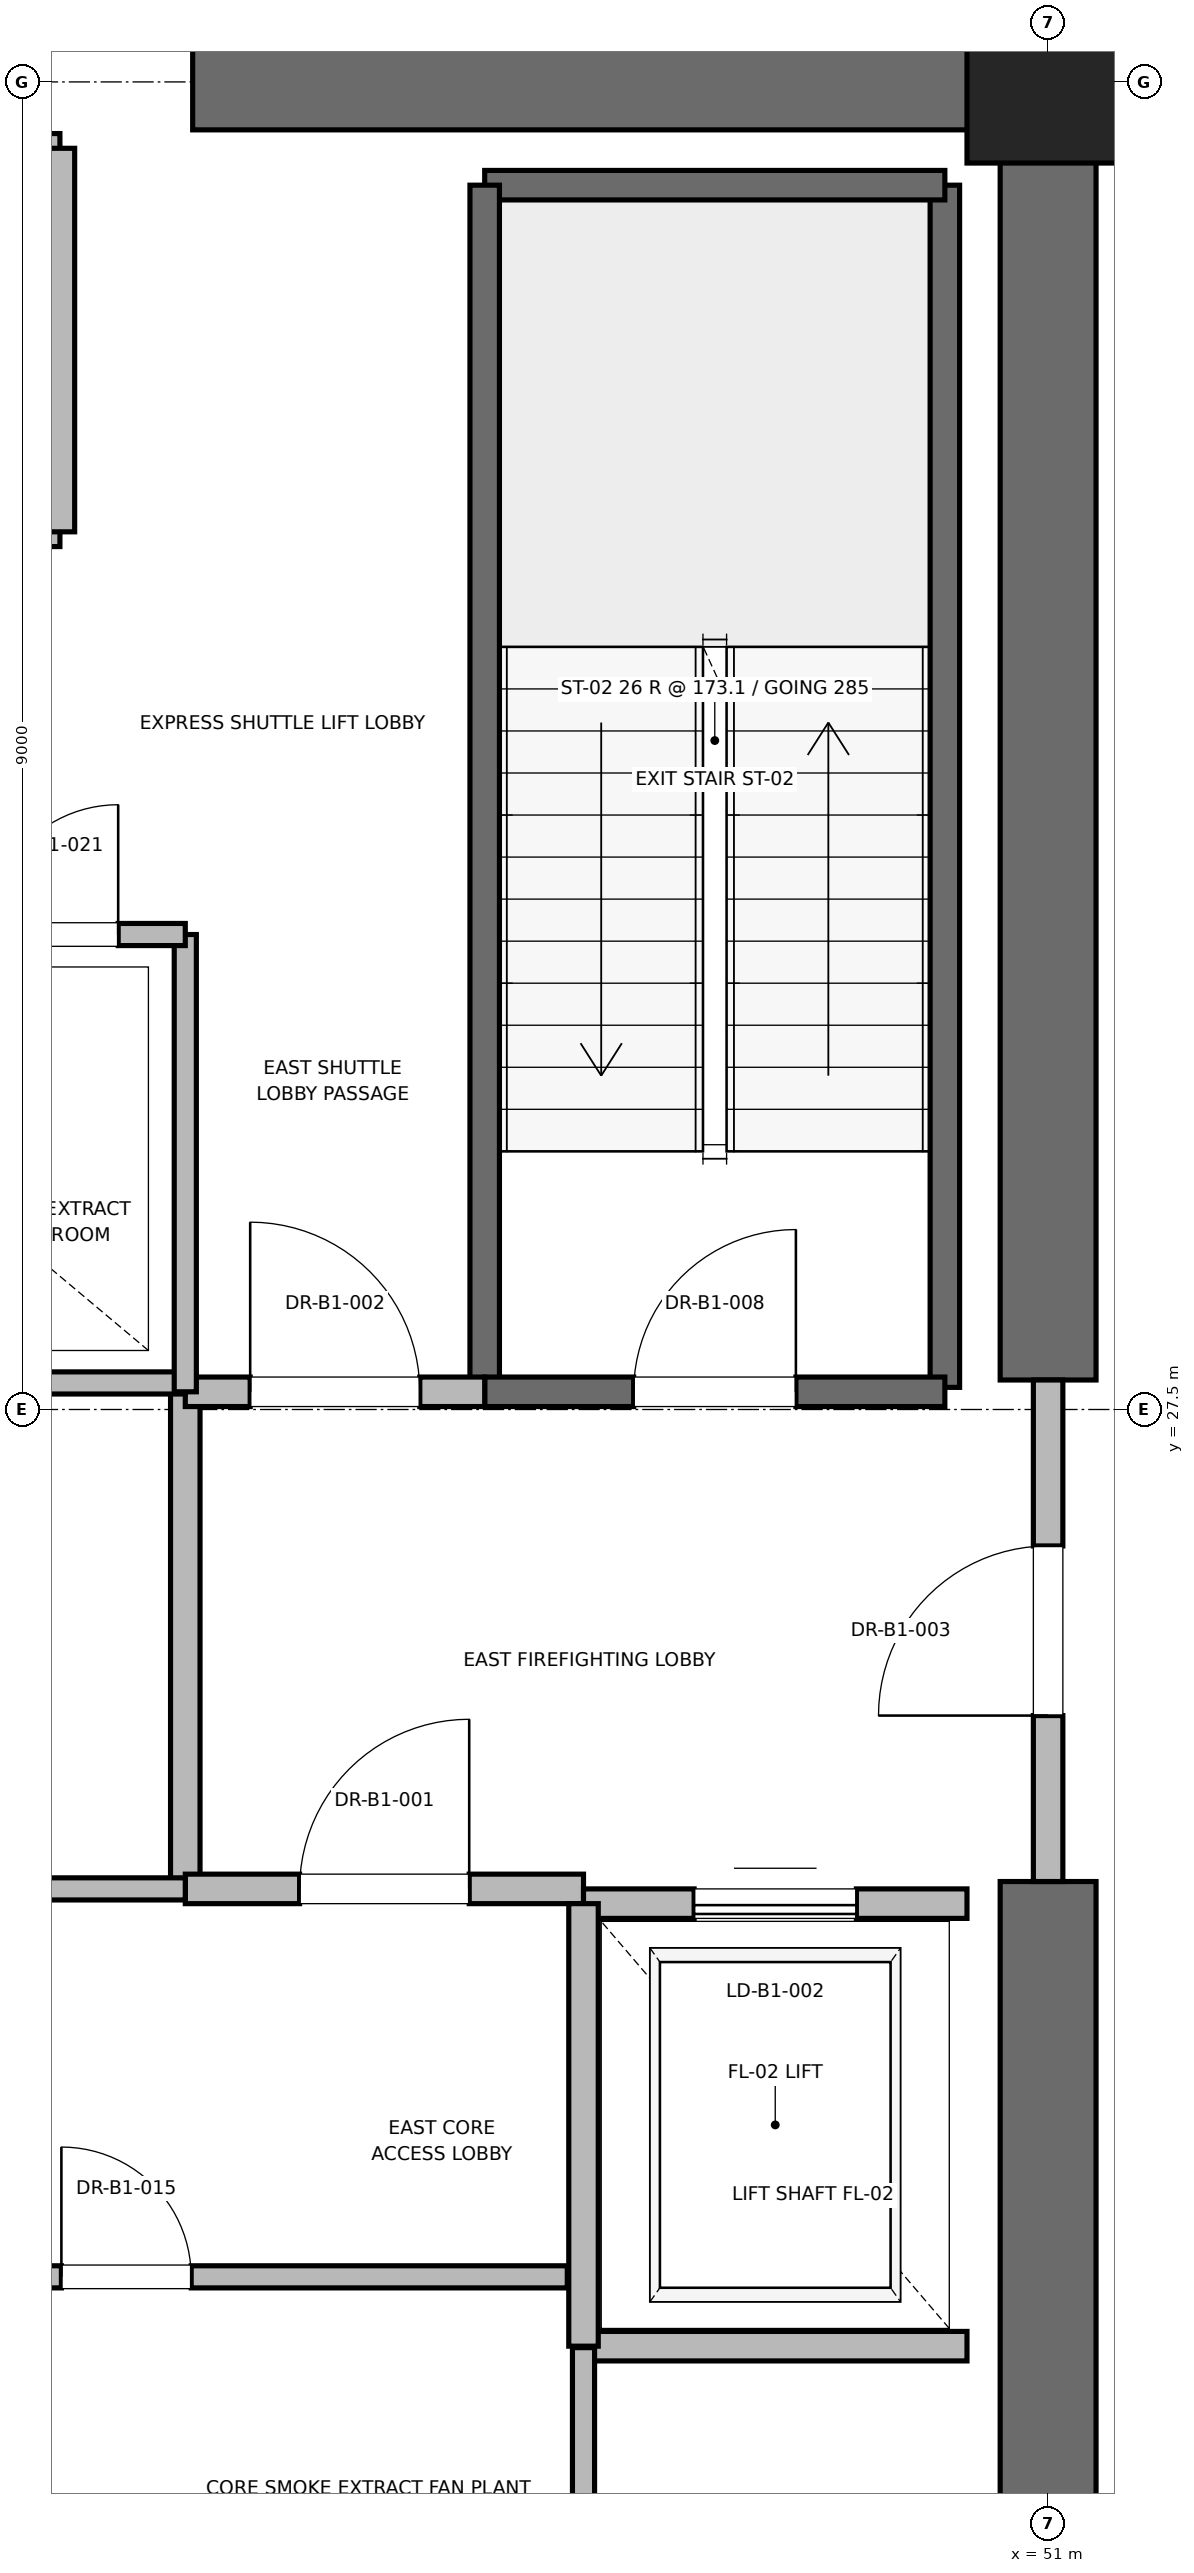
"""IFC4 building model, lengths in metres.
Left out: names, types, materials, properties, quantities, classifications, styles, units other than length and angle.
Written with IfcOpenShell. Run it as: python <this file> out.ifc"""

import sys

from ifc_helpers import new_model, si_unit, direction, frame, frame_2d, origin, origin_2d, place, context, subcontext, project, spatial, rectangle, extrude, element, fill, save


model = new_model("IFC4")
c1 = context("Model", 3, precision=1e-05, world=origin(), true_north=direction((0.0, 1.0)))
c2 = subcontext(c1, "Body", "Model", "MODEL_VIEW")
j1 = project(units=[si_unit("LENGTHUNIT", "METRE"), si_unit("PLANEANGLEUNIT", "RADIAN")], contexts=[c1])
p1 = place(None, origin())
s1 = spatial("IfcSite", under=j1, at=p1, CompositionType="ELEMENT")
p2 = place(p1, origin())
s2 = spatial("IfcBuilding", under=s1, at=p2, CompositionType="ELEMENT")
p3 = place(p2, frame((0.0, 0.0, -4.5)))
s3 = spatial("IfcBuildingStorey", under=s2, at=p3, CompositionType="ELEMENT", Elevation=-4.5)
p4 = place(p3, frame((51.0, 36.5, 0.0), z_axis=(0.0, 0.0, 1.0), x_axis=(1.0, 0.0, 0.0)))
e1 = element("IfcColumn", 1, at=p4, inside=s3, PredefinedType="PILASTER", context=c2, shape_type="SweptSolid", body=[
    extrude(rectangle(XDim=1.1, YDim=1.1, at=origin_2d()), origin(), (0.0, 0.0, 1.0), 4.5),
])
for number, where, z_axis, x_axis in (
    (2, (45.2, 36.5, 0.0), (0.0, 0.0, 1.0), (1.0, 0.0, 0.0)),
    (3, (51.0, 18.5, 0.0), (0.0, 0.0, 1.0), (0.0, 1.0, 0.0)),
):
    element("IfcWall", number, at=place(p3, frame(where, z_axis=z_axis, x_axis=x_axis)), inside=s3, PredefinedType="SHEAR", context=c2, shape_type="SweptSolid", body=[
        extrude(rectangle(XDim=5.8, YDim=0.65, at=frame_2d((2.9, 0.0))), origin(), (0.0, 0.0, 1.0), 4.22),
    ])
p5 = place(p3, frame((51.0, 27.7, 0.0), z_axis=(0.0, 0.0, 1.0), x_axis=(0.0, 1.0, 0.0)))
e4 = element("IfcWall", 4, at=p5, inside=s3, PredefinedType="SHEAR", context=c2, shape_type="SweptSolid", body=[
    extrude(rectangle(XDim=8.8, YDim=0.65, at=frame_2d((4.4, 0.0))), origin(), (0.0, 0.0, 1.0), 4.22),
])
p6 = place(p3, frame((50.3, 27.65, 0.0), z_axis=(0.0, 0.0, 1.0), x_axis=(0.0, 1.0, 0.0)))
e5 = element("IfcWall", 5, at=p6, inside=s3, PredefinedType="SOLIDWALL", context=c2, shape_type="SweptSolid", body=[
    extrude(rectangle(XDim=8.15, YDim=0.2, at=frame_2d((4.075, 0.0))), origin(), (0.0, 0.0, 1.0), 4.22),
])
p7 = place(p3, frame((47.18, 35.8, 0.0), z_axis=(0.0, 0.0, 1.0), x_axis=(1.0, 0.0, 0.0)))
e6 = element("IfcWall", 6, at=p7, inside=s3, PredefinedType="SOLIDWALL", context=c2, shape_type="SweptSolid", body=[
    extrude(rectangle(XDim=3.12, YDim=0.2, at=frame_2d((1.56, 0.0))), origin(), (0.0, 0.0, 1.0), 4.22),
])
p8 = place(p3, frame((47.18, 27.62, 0.0), z_axis=(0.0, 0.0, 1.0), x_axis=(0.0, 1.0, 0.0)))
e7 = element("IfcWall", 7, at=p8, inside=s3, PredefinedType="SOLIDWALL", context=c2, shape_type="SweptSolid", body=[
    extrude(rectangle(XDim=8.18, YDim=0.2, at=frame_2d((4.09, 0.0))), origin(), (0.0, 0.0, 1.0), 4.22),
])
p9 = place(p3, frame((47.18, 27.62, 0.0), z_axis=(0.0, 0.0, 1.0), x_axis=(1.0, 0.0, 0.0)))
e8 = element("IfcWall", 8, at=p9, inside=s3, PredefinedType="SOLIDWALL", context=c2, shape_type="SweptSolid", body=[
    extrude(rectangle(XDim=3.12, YDim=0.2, at=frame_2d((1.56, 0.0))), origin(), (0.0, 0.0, 1.0), 4.22),
])
p10 = place(p9, frame((1.01, 0.0, 0.0)))
e9 = element("IfcOpeningElement", 9, at=p10, cuts=e8, PredefinedType="OPENING", context=c2, shape_type="SweptSolid", body=[
    extrude(rectangle(XDim=1.1, YDim=2.15, at=frame_2d((0.55, 1.075))), frame((0.0, 0.1, 0.0), z_axis=(0.0, -1.0, 0.0), x_axis=(1.0, 0.0, 0.0)), (0.0, 0.0, 1.0), 0.2),
])
p11 = place(p3, frame((45.15, 24.25, 0.0), z_axis=(0.0, 0.0, 1.0), x_axis=(0.0, 1.0, 0.0)))
e10 = element("IfcWall", 10, at=p11, inside=s3, PredefinedType="PARTITIONING", context=c2, shape_type="SweptSolid", body=[
    extrude(rectangle(XDim=3.37, YDim=0.2, at=frame_2d((1.685, 0.0))), origin(), (0.0, 0.0, 1.0), 4.22),
])
p12 = place(p3, frame((45.15, 24.25, 0.0), z_axis=(0.0, 0.0, 1.0), x_axis=(1.0, 0.0, 0.0)))
e11 = element("IfcWall", 11, at=p12, inside=s3, PredefinedType="PARTITIONING", context=c2, shape_type="SweptSolid", body=[
    extrude(rectangle(XDim=2.7, YDim=0.2, at=frame_2d((1.35, 0.0))), origin(), (0.0, 0.0, 1.0), 4.22),
])
p13 = place(p12, frame((0.775, 0.0, 0.0)))
e12 = element("IfcOpeningElement", 12, at=p13, cuts=e11, PredefinedType="OPENING", context=c2, shape_type="SweptSolid", body=[
    extrude(rectangle(XDim=1.15, YDim=2.2, at=frame_2d((0.575, 1.1))), frame((0.0, 0.1, 0.0), z_axis=(0.0, -1.0, 0.0), x_axis=(1.0, 0.0, 0.0)), (0.0, 0.0, 1.0), 0.2),
])
p14 = place(p3, frame((45.15, 27.62, 0.0), z_axis=(0.0, 0.0, 1.0), x_axis=(1.0, 0.0, 0.0)))
e13 = element("IfcWall", 13, at=p14, inside=s3, PredefinedType="PARTITIONING", context=c2, shape_type="SweptSolid", body=[
    extrude(rectangle(XDim=2.03, YDim=0.2, at=frame_2d((1.015, 0.0))), origin(), (0.0, 0.0, 1.0), 4.22),
])
p15 = place(p14, frame((0.44, 0.0, 0.0)))
e14 = element("IfcOpeningElement", 14, at=p15, cuts=e13, PredefinedType="OPENING", context=c2, shape_type="SweptSolid", body=[
    extrude(rectangle(XDim=1.15, YDim=2.2, at=frame_2d((0.575, 1.1))), frame((0.0, 0.1, 0.0), z_axis=(0.0, -1.0, 0.0), x_axis=(1.0, 0.0, 0.0)), (0.0, 0.0, 1.0), 0.2),
])
p16 = place(p3, frame((51.0, 24.3, 0.0), z_axis=(0.0, 0.0, 1.0), x_axis=(0.0, 1.0, 0.0)))
e15 = element("IfcWall", 15, at=p16, inside=s3, PredefinedType="PARTITIONING", context=c2, shape_type="SweptSolid", body=[
    extrude(rectangle(XDim=3.4, YDim=0.2, at=frame_2d((1.7, 0.0))), origin(), (0.0, 0.0, 1.0), 3.0),
])
p17 = place(p16, frame((1.125, 0.0, 0.0)))
e16 = element("IfcOpeningElement", 16, at=p17, cuts=e15, PredefinedType="OPENING", context=c2, shape_type="SweptSolid", body=[
    extrude(rectangle(XDim=1.15, YDim=2.2, at=frame_2d((0.575, 1.1))), frame((0.0, 0.1, 0.0), z_axis=(0.0, -1.0, 0.0), x_axis=(1.0, 0.0, 0.0)), (0.0, 0.0, 1.0), 0.2),
])
p18 = place(p3, frame((47.85, 21.15, 0.0), z_axis=(0.0, 0.0, 1.0), x_axis=(1.0, 0.0, 0.0)))
e17 = element("IfcWall", 17, at=p18, inside=s3, PredefinedType="SOLIDWALL", context=c2, shape_type="SweptSolid", body=[
    extrude(rectangle(XDim=2.6, YDim=0.2, at=frame_2d((1.3, 0.0))), origin(), (0.0, 0.0, 1.0), 4.22),
])
p19 = place(p3, frame((50.45, 24.15, 0.0), z_axis=(0.0, 0.0, 1.0), x_axis=(-1.0, 0.0, 0.0)))
e18 = element("IfcWall", 18, at=p19, inside=s3, PredefinedType="SOLIDWALL", context=c2, shape_type="SweptSolid", body=[
    extrude(rectangle(XDim=2.6, YDim=0.2, at=frame_2d((1.3, 0.0))), origin(), (0.0, 0.0, 1.0), 3.0),
])
p20 = place(p19, frame((0.75, 0.0, 0.0)))
e19 = element("IfcOpeningElement", 19, at=p20, cuts=e18, PredefinedType="OPENING", context=c2, shape_type="SweptSolid", body=[
    extrude(rectangle(XDim=1.1, YDim=2.2, at=frame_2d((0.55, 1.1))), frame((0.0, 0.1, 0.0), z_axis=(0.0, -1.0, 0.0), x_axis=(1.0, 0.0, 0.0)), (0.0, 0.0, 1.0), 0.2),
])
p21 = place(p3, frame((47.85, 24.15, 0.0), z_axis=(0.0, 0.0, 1.0), x_axis=(0.0, -1.0, 0.0)))
e20 = element("IfcWall", 20, at=p21, inside=s3, PredefinedType="SOLIDWALL", context=c2, shape_type="SweptSolid", body=[
    extrude(rectangle(XDim=3.0, YDim=0.2, at=frame_2d((1.5, 0.0))), origin(), (0.0, 0.0, 1.0), 4.22),
])
p22 = place(p3, frame((42.0, 33.45, 0.0), z_axis=(0.0, 0.0, 1.0), x_axis=(1.0, 0.0, 0.0)))
e21 = element("IfcWall", 21, at=p22, inside=s3, PredefinedType="SOLIDWALL", context=c2, shape_type="SweptSolid", body=[
    extrude(rectangle(XDim=2.3, YDim=0.2, at=frame_2d((1.15, 0.0))), origin(), (0.0, 0.0, 1.0), 4.22),
])
p23 = place(p22, frame((0.6, 0.0, 0.0)))
e22 = element("IfcOpeningElement", 22, at=p23, cuts=e21, PredefinedType="OPENING", context=c2, shape_type="SweptSolid", body=[
    extrude(rectangle(XDim=1.1, YDim=2.2, at=frame_2d((0.55, 1.1))), frame((0.0, 0.1, 0.0), z_axis=(0.0, -1.0, 0.0), x_axis=(1.0, 0.0, 0.0)), (0.0, 0.0, 1.0), 0.2),
])
p24 = place(p3, frame((44.3, 36.05, 0.0), z_axis=(0.0, 0.0, 1.0), x_axis=(-1.0, 0.0, 0.0)))
e23 = element("IfcWall", 23, at=p24, inside=s3, PredefinedType="SOLIDWALL", context=c2, shape_type="SweptSolid", body=[
    extrude(rectangle(XDim=2.3, YDim=0.2, at=frame_2d((1.15, 0.0))), origin(), (0.0, 0.0, 1.0), 3.0),
])
p25 = place(p3, frame((44.3, 33.45, 0.0), z_axis=(0.0, 0.0, 1.0), x_axis=(0.0, 1.0, 0.0)))
e24 = element("IfcWall", 24, at=p25, inside=s3, PredefinedType="SOLIDWALL", context=c2, shape_type="SweptSolid", body=[
    extrude(rectangle(XDim=2.6, YDim=0.2, at=frame_2d((1.3, 0.0))), origin(), (0.0, 0.0, 1.0), 3.0),
])
p26 = place(p3, frame((41.56, 27.68, 0.0), z_axis=(0.0, 0.0, 1.0), x_axis=(1.0, 0.0, 0.0)))
e25 = element("IfcWall", 25, at=p26, inside=s3, PredefinedType="PARTITIONING", context=c2, shape_type="SweptSolid", body=[
    extrude(rectangle(XDim=3.59, YDim=0.15, at=frame_2d((1.795, 0.0))), origin(), (0.0, 0.0, 1.0), 2.85),
])
p27 = place(p3, frame((47.85, 18.6, 0.0), z_axis=(0.0, 0.0, 1.0), x_axis=(0.0, 1.0, 0.0)))
e26 = element("IfcWall", 26, at=p27, inside=s3, PredefinedType="PARTITIONING", context=c2, shape_type="SweptSolid", body=[
    extrude(rectangle(XDim=2.54, YDim=0.15, at=frame_2d((1.27, 0.0))), origin(), (0.0, 0.0, 1.0), 2.85),
])
p28 = place(p3, frame((41.76, 21.62, 0.0), z_axis=(0.0, 0.0, 1.0), x_axis=(1.0, 0.0, 0.0)))
e27 = element("IfcWall", 27, at=p28, inside=s3, PredefinedType="PARTITIONING", context=c2, shape_type="SweptSolid", body=[
    extrude(rectangle(XDim=5.98, YDim=0.15, at=frame_2d((2.99, 0.0))), origin(), (0.0, 0.0, 1.0), 2.85),
])
p29 = place(p28, frame((2.55, 0.0, 0.0)))
e28 = element("IfcOpeningElement", 28, at=p29, cuts=e27, PredefinedType="OPENING", context=c2, shape_type="SweptSolid", body=[
    extrude(rectangle(XDim=0.88, YDim=2.1, at=frame_2d((0.44, 1.05))), frame((0.0, 0.075, 0.0), z_axis=(0.0, -1.0, 0.0), x_axis=(1.0, 0.0, 0.0)), (0.0, 0.0, 1.0), 0.15),
])
p30 = place(p3, frame((41.76, 24.25, 0.0), z_axis=(0.0, 0.0, 1.0), x_axis=(1.0, 0.0, 0.0)))
e29 = element("IfcWall", 29, at=p30, inside=s3, PredefinedType="PARTITIONING", context=c2, shape_type="SweptSolid", body=[
    extrude(rectangle(XDim=3.39, YDim=0.15, at=frame_2d((1.695, 0.0))), origin(), (0.0, 0.0, 1.0), 2.85),
])
p31 = place(p30, frame((1.255, 0.0, 0.0)))
e30 = element("IfcOpeningElement", 30, at=p31, cuts=e29, PredefinedType="OPENING", context=c2, shape_type="SweptSolid", body=[
    extrude(rectangle(XDim=0.88, YDim=2.1, at=frame_2d((0.44, 1.05))), frame((0.0, 0.075, 0.0), z_axis=(0.0, -1.0, 0.0), x_axis=(1.0, 0.0, 0.0)), (0.0, 0.0, 1.0), 0.15),
])
p32 = place(p3, frame((45.15, 27.62, 0.0), z_axis=(0.0, 0.0, 1.0), x_axis=(0.0, 1.0, 0.0)))
e31 = element("IfcWall", 31, at=p32, inside=s3, PredefinedType="PARTITIONING", context=c2, shape_type="SweptSolid", body=[
    extrude(rectangle(XDim=3.1, YDim=0.15, at=frame_2d((1.55, 0.0))), origin(), (0.0, 0.0, 1.0), 2.85),
])
p33 = place(p3, frame((43.36, 30.72, 0.0), z_axis=(0.0, 0.0, 1.0), x_axis=(1.0, 0.0, 0.0)))
e32 = element("IfcWall", 32, at=p33, inside=s3, PredefinedType="PARTITIONING", context=c2, shape_type="SweptSolid", body=[
    extrude(rectangle(XDim=1.79, YDim=0.15, at=frame_2d((0.895, 0.0))), origin(), (0.0, 0.0, 1.0), 2.85),
])
p34 = place(p33, frame((0.455, 0.0, 0.0)))
e33 = element("IfcOpeningElement", 33, at=p34, cuts=e32, PredefinedType="OPENING", context=c2, shape_type="SweptSolid", body=[
    extrude(rectangle(XDim=0.88, YDim=2.1, at=frame_2d((0.44, 1.05))), frame((0.0, 0.075, 0.0), z_axis=(0.0, -1.0, 0.0), x_axis=(1.0, 0.0, 0.0)), (0.0, 0.0, 1.0), 0.15),
])
p35 = place(p10, origin())
e34 = element("IfcDoor", 34, at=p35, inside=s3, OperationType="SINGLE_SWING_RIGHT", PredefinedType="DOOR", context=c2, shape_type="SweptSolid", body=[
    extrude(rectangle(XDim=1.1, YDim=2.15, at=frame_2d((0.55, 1.075))), frame((0.0, 0.025, 0.0), z_axis=(0.0, -1.0, 0.0), x_axis=(1.0, 0.0, 0.0)), (0.0, 0.0, 1.0), 0.05),
])
fill(e9, e34)
p36 = place(p13, origin())
e35 = element("IfcDoor", 35, at=p36, inside=s3, OperationType="SINGLE_SWING_RIGHT", PredefinedType="DOOR", context=c2, shape_type="SweptSolid", body=[
    extrude(rectangle(XDim=1.15, YDim=2.2, at=frame_2d((0.575, 1.1))), frame((0.0, 0.025, 0.0), z_axis=(0.0, -1.0, 0.0), x_axis=(1.0, 0.0, 0.0)), (0.0, 0.0, 1.0), 0.05),
])
fill(e12, e35)
p37 = place(p15, origin())
e36 = element("IfcDoor", 36, at=p37, inside=s3, OperationType="SINGLE_SWING_LEFT", PredefinedType="DOOR", context=c2, shape_type="SweptSolid", body=[
    extrude(rectangle(XDim=1.15, YDim=2.2, at=frame_2d((0.575, 1.1))), frame((0.0, 0.025, 0.0), z_axis=(0.0, -1.0, 0.0), x_axis=(1.0, 0.0, 0.0)), (0.0, 0.0, 1.0), 0.05),
])
fill(e14, e36)
p38 = place(p17, origin())
e37 = element("IfcDoor", 37, at=p38, inside=s3, OperationType="SINGLE_SWING_LEFT", PredefinedType="DOOR", context=c2, shape_type="SweptSolid", body=[
    extrude(rectangle(XDim=1.15, YDim=2.2, at=frame_2d((0.575, 1.1))), frame((0.0, 0.025, 0.0), z_axis=(0.0, -1.0, 0.0), x_axis=(1.0, 0.0, 0.0)), (0.0, 0.0, 1.0), 0.05),
])
fill(e16, e37)
p39 = place(p20, origin())
e38 = element("IfcDoor", 38, at=p39, inside=s3, OperationType="SLIDING_TO_RIGHT", PredefinedType="DOOR", context=c2, shape_type="SweptSolid", body=[
    extrude(rectangle(XDim=1.1, YDim=2.2, at=frame_2d((0.55, 1.1))), frame((0.0, 0.025, 0.0), z_axis=(0.0, -1.0, 0.0), x_axis=(1.0, 0.0, 0.0)), (0.0, 0.0, 1.0), 0.05),
])
fill(e19, e38)
p40 = place(p29, origin())
e39 = element("IfcDoor", 39, at=p40, inside=s3, OperationType="SINGLE_SWING_LEFT", PredefinedType="DOOR", context=c2, shape_type="SweptSolid", body=[
    extrude(rectangle(XDim=0.88, YDim=2.1, at=frame_2d((0.44, 1.05))), frame((0.0, 0.025, 0.0), z_axis=(0.0, -1.0, 0.0), x_axis=(1.0, 0.0, 0.0)), (0.0, 0.0, 1.0), 0.05),
])
fill(e28, e39)
p41 = place(p34, origin())
e40 = element("IfcDoor", 40, at=p41, inside=s3, OperationType="SINGLE_SWING_RIGHT", PredefinedType="DOOR", context=c2, shape_type="SweptSolid", body=[
    extrude(rectangle(XDim=0.88, YDim=2.1, at=frame_2d((0.44, 1.05))), frame((0.0, 0.025, 0.0), z_axis=(0.0, -1.0, 0.0), x_axis=(1.0, 0.0, 0.0)), (0.0, 0.0, 1.0), 0.05),
])
fill(e33, e40)
save(model, sys.argv[1])
